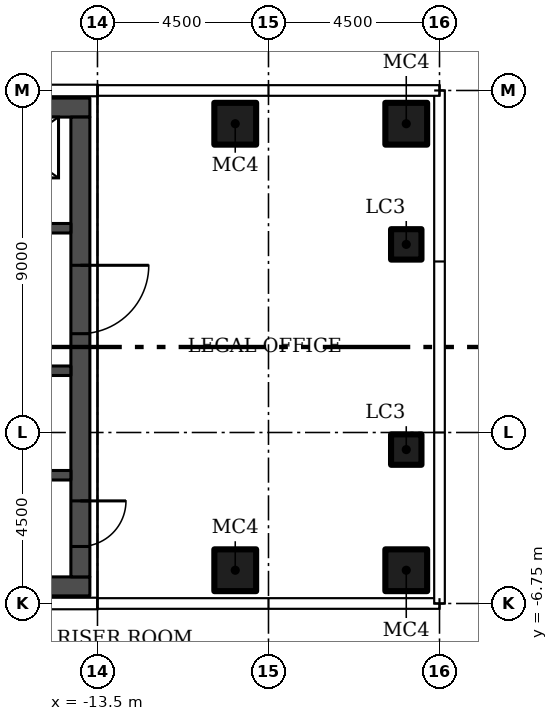
"""IFC4 building model, lengths in metres.
Left out: names, types, materials, properties, quantities, classifications, styles, units other than length and angle.
Written with IfcOpenShell. Run it as: python <this file> out.ifc"""

import sys

from ifc_helpers import new_model, si_unit, direction, frame, frame_2d, origin, origin_2d, place, context, subcontext, project, spatial, rectangle, hollow_rectangle, extrude, element, fill, save


model = new_model("IFC4")
c1 = context("Model", 3, precision=1e-05, world=origin(), true_north=direction((0.0, 1.0)))
c2 = subcontext(c1, "Body", "Model", "MODEL_VIEW")
j1 = project(units=[si_unit("LENGTHUNIT", "METRE"), si_unit("PLANEANGLEUNIT", "RADIAN")], contexts=[c1])
p1 = place(None, origin())
s1 = spatial("IfcSite", under=j1, at=p1, CompositionType="ELEMENT")
p2 = place(p1, origin())
s2 = spatial("IfcBuilding", under=s1, at=p2, CompositionType="ELEMENT")
p3 = place(p2, frame((0.0, 0.0, 150.6)))
s3 = spatial("IfcBuildingStorey", under=s2, at=p3, CompositionType="ELEMENT", Elevation=150.6)
for number, where in (
    (1, (-9.875, -5.875, 0.0)),
    (2, (-5.375, -5.875, 0.0)),
    (3, (-9.875, 5.875, 0.0)),
    (4, (-5.375, 5.875, 0.0)),
):
    element("IfcColumn", number, at=place(p3, frame(where)), inside=s3, PredefinedType="COLUMN", context=c2, shape_type="SweptSolid", body=[
        extrude(hollow_rectangle(XDim=1.1, YDim=1.1, WallThickness=0.04, at=origin_2d()), origin(), (0.0, 0.0, 1.0), 3.55),
    ])
for number, where in (
    (5, (-5.375, -2.7, 0.0)),
    (6, (-5.375, 2.7, 0.0)),
):
    element("IfcColumn", number, at=place(p3, frame(where)), inside=s3, PredefinedType="COLUMN", context=c2, shape_type="SweptSolid", body=[
        extrude(hollow_rectangle(XDim=0.8, YDim=0.8, WallThickness=0.03, at=origin_2d()), origin(), (0.0, 0.0, 1.0), 3.55),
    ])
for number, where in (
    (7, (-26.8, -6.3, 0.0)),
    (8, (-26.8, 6.3, 0.0)),
):
    element("IfcWall", number, at=place(p3, frame(where)), inside=s3, PredefinedType="SHEAR", context=c2, shape_type="SweptSolid", body=[
        extrude(rectangle(XDim=13.1, YDim=0.5, at=frame_2d((6.55, 0.0))), origin(), (0.0, 0.0, 1.0), 3.55),
    ])
p4 = place(p3, frame((-13.95, 6.05, 0.0), z_axis=(0.0, 0.0, 1.0), x_axis=(0.0, -1.0, 0.0)))
e9 = element("IfcWall", 9, at=p4, inside=s3, PredefinedType="SHEAR", context=c2, shape_type="SweptSolid", body=[
    extrude(rectangle(XDim=12.1, YDim=0.5, at=frame_2d((6.05, 0.0))), origin(), (0.0, 0.0, 1.0), 3.55),
])
p5 = place(p4, frame((10.1, 0.0, 0.0)))
e10 = element("IfcOpeningElement", 10, at=p5, cuts=e9, PredefinedType="OPENING", context=c2, shape_type="SweptSolid", body=[
    extrude(rectangle(XDim=1.2, YDim=2.1, at=frame_2d((0.6, 1.05))), frame((0.0, 0.26, 0.0), z_axis=(0.0, -1.0, 0.0), x_axis=(1.0, 0.0, 0.0)), (0.0, 0.0, 1.0), 0.52),
])
p6 = place(p4, frame((3.9, 0.0, 0.0)))
e11 = element("IfcOpeningElement", 11, at=p6, cuts=e9, PredefinedType="OPENING", context=c2, shape_type="SweptSolid", body=[
    extrude(rectangle(XDim=1.8, YDim=2.4, at=frame_2d((0.9, 1.2))), frame((0.0, 0.26, 0.0), z_axis=(0.0, -1.0, 0.0), x_axis=(1.0, 0.0, 0.0)), (0.0, 0.0, 1.0), 0.52),
])
p7 = place(p3, frame((-14.2, -3.375, 0.0), z_axis=(0.0, 0.0, 1.0), x_axis=(-1.0, 0.0, 0.0)))
e12 = element("IfcWall", 12, at=p7, inside=s3, PredefinedType="SHEAR", context=c2, shape_type="SweptSolid", body=[
    extrude(rectangle(XDim=12.1, YDim=0.25, at=frame_2d((6.05, 0.0))), origin(), (0.0, 0.0, 1.0), 3.55),
])
p8 = place(p7, frame((10.95, 0.0, 0.0)))
e13 = element("IfcOpeningElement", 13, at=p8, cuts=e12, PredefinedType="OPENING", context=c2, shape_type="SweptSolid", body=[
    extrude(rectangle(XDim=1.1, YDim=2.1, at=frame_2d((0.55, 1.05))), frame((0.0, 0.135, 0.0), z_axis=(0.0, -1.0, 0.0), x_axis=(1.0, 0.0, 0.0)), (0.0, 0.0, 1.0), 0.27),
])
p9 = place(p3, frame((-14.2, -0.625, 0.0), z_axis=(0.0, 0.0, 1.0), x_axis=(-1.0, 0.0, 0.0)))
e14 = element("IfcWall", 14, at=p9, inside=s3, PredefinedType="SHEAR", context=c2, shape_type="SweptSolid", body=[
    extrude(rectangle(XDim=12.1, YDim=0.25, at=frame_2d((6.05, 0.0))), origin(), (0.0, 0.0, 1.0), 3.55),
])
p10 = place(p9, frame((8.65, 0.0, 0.0)))
e15 = element("IfcOpeningElement", 15, at=p10, cuts=e14, PredefinedType="OPENING", context=c2, shape_type="SweptSolid", body=[
    extrude(rectangle(XDim=1.2, YDim=2.1, at=frame_2d((0.6, 1.05))), frame((0.0, 0.135, 0.0), z_axis=(0.0, -1.0, 0.0), x_axis=(1.0, 0.0, 0.0)), (0.0, 0.0, 1.0), 0.27),
])
p11 = place(p9, frame((1.175, 0.0, 0.0)))
e16 = element("IfcOpeningElement", 16, at=p11, cuts=e14, PredefinedType="OPENING", context=c2, shape_type="SweptSolid", body=[
    extrude(rectangle(XDim=0.9, YDim=2.1, at=frame_2d((0.45, 1.05))), frame((0.0, 0.135, 0.0), z_axis=(0.0, -1.0, 0.0), x_axis=(1.0, 0.0, 0.0)), (0.0, 0.0, 1.0), 0.27),
])
p12 = place(p3, frame((-26.3, 3.125, 0.0)))
e17 = element("IfcWall", 17, at=p12, inside=s3, PredefinedType="SHEAR", context=c2, shape_type="SweptSolid", body=[
    extrude(rectangle(XDim=12.1, YDim=0.25, at=frame_2d((6.05, 0.0))), origin(), (0.0, 0.0, 1.0), 3.55),
])
p13 = place(p12, frame((6.95, 0.0, 0.0)))
e18 = element("IfcOpeningElement", 18, at=p13, cuts=e17, PredefinedType="OPENING", context=c2, shape_type="SweptSolid", body=[
    extrude(rectangle(XDim=1.1, YDim=2.1, at=frame_2d((0.55, 1.05))), frame((0.0, 0.135, 0.0), z_axis=(0.0, -1.0, 0.0), x_axis=(1.0, 0.0, 0.0)), (0.0, 0.0, 1.0), 0.27),
])
p14 = place(p12, frame((10.075, 0.0, 0.0)))
e19 = element("IfcOpeningElement", 19, at=p14, cuts=e17, PredefinedType="OPENING", context=c2, shape_type="SweptSolid", body=[
    extrude(rectangle(XDim=1.1, YDim=2.1, at=frame_2d((0.55, 1.05))), frame((0.0, 0.135, 0.0), z_axis=(0.0, -1.0, 0.0), x_axis=(1.0, 0.0, 0.0)), (0.0, 0.0, 1.0), 0.27),
])
p15 = place(p12, frame((2.475, 0.0, 0.0)))
e20 = element("IfcOpeningElement", 20, at=p15, cuts=e17, PredefinedType="OPENING", context=c2, shape_type="SweptSolid", body=[
    extrude(rectangle(XDim=0.9, YDim=2.1, at=frame_2d((0.45, 1.05))), frame((0.0, 0.135, 0.0), z_axis=(0.0, -1.0, 0.0), x_axis=(1.0, 0.0, 0.0)), (0.0, 0.0, 1.0), 0.27),
])
p16 = place(p5, origin())
e21 = element("IfcDoor", 21, at=p16, inside=s3, OperationType="SINGLE_SWING_RIGHT", PredefinedType="DOOR", context=c2, shape_type="SweptSolid", body=[
    extrude(rectangle(XDim=1.2, YDim=2.1, at=frame_2d((0.6, 1.05))), frame((0.0, 0.025, 0.0), z_axis=(0.0, -1.0, 0.0), x_axis=(1.0, 0.0, 0.0)), (0.0, 0.0, 1.0), 0.05),
])
fill(e10, e21)
p17 = place(p6, origin())
e22 = element("IfcDoor", 22, at=p17, inside=s3, OperationType="DOUBLE_DOOR_SINGLE_SWING", PredefinedType="DOOR", context=c2, shape_type="SweptSolid", body=[
    extrude(rectangle(XDim=1.8, YDim=2.4, at=frame_2d((0.9, 1.2))), frame((0.0, 0.025, 0.0), z_axis=(0.0, -1.0, 0.0), x_axis=(1.0, 0.0, 0.0)), (0.0, 0.0, 1.0), 0.05),
])
fill(e11, e22)
save(model, sys.argv[1])
